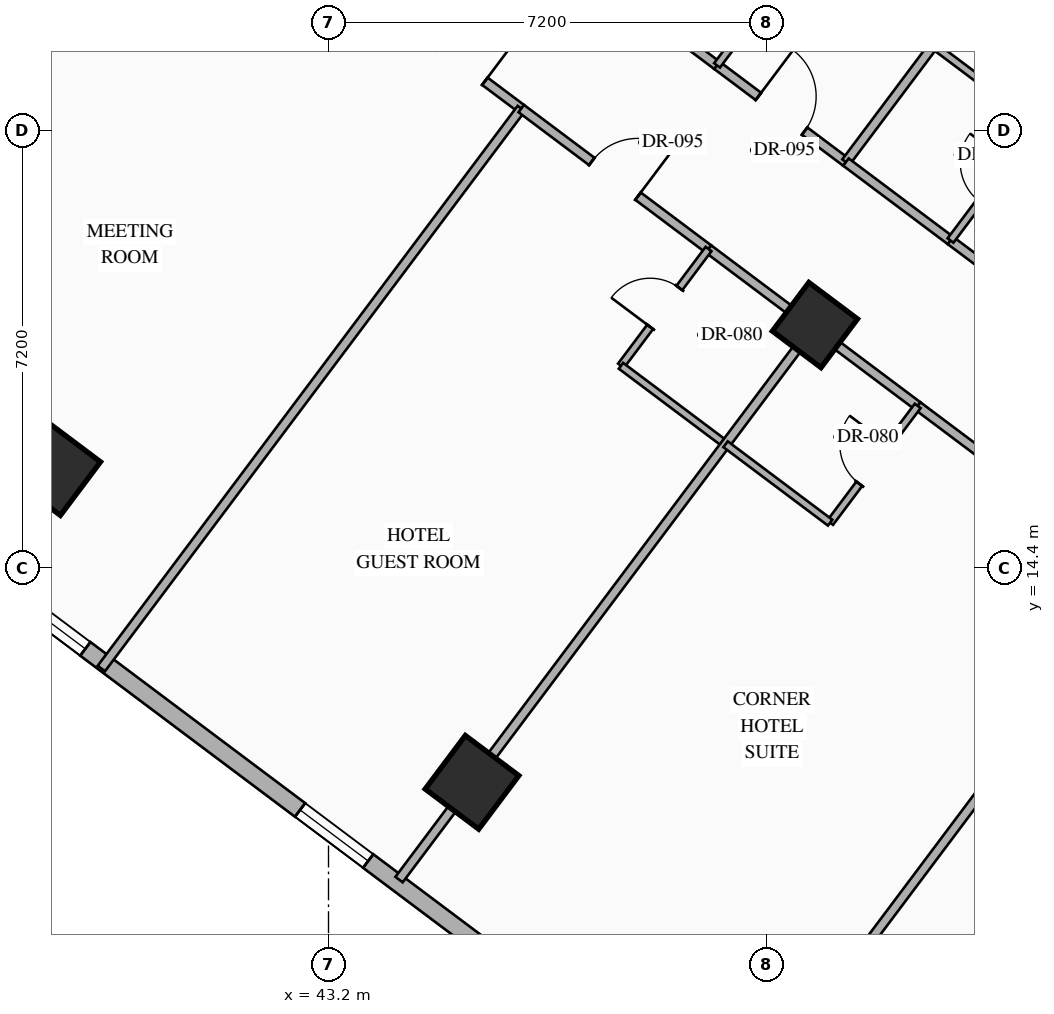
"""IFC4 building model, lengths in metres.
Left out: names, types, materials, properties, quantities, classifications, styles, units other than length and angle.
Written with IfcOpenShell. Run it as: python <this file> out.ifc"""

import sys

from ifc_helpers import new_model, si_unit, direction, frame, frame_2d, origin, origin_2d, place, context, subcontext, project, spatial, rectangle, hollow_rectangle, extrude, element, fill, save


model = new_model("IFC4")
c1 = context("Model", 3, precision=1e-05, world=origin(), true_north=direction((0.0, 1.0)))
c2 = subcontext(c1, "Body", "Model", "MODEL_VIEW")
j1 = project(units=[si_unit("LENGTHUNIT", "METRE"), si_unit("PLANEANGLEUNIT", "RADIAN")], contexts=[c1])
p1 = place(None, origin())
s1 = spatial("IfcSite", under=j1, at=p1, CompositionType="ELEMENT")
p2 = place(p1, origin())
s2 = spatial("IfcBuilding", under=s1, at=p2, CompositionType="ELEMENT")
p3 = place(p2, frame((0.0, 0.0, 50.0)))
s3 = spatial("IfcBuildingStorey", under=s2, at=p3, CompositionType="ELEMENT", Elevation=50.0)
for number, where, z_axis, x_axis in (
    (1, (38.68, 16.04, 0.0), (0.0, 0.0, 1.0), (0.8, -0.6, 0.0)),
    (2, (45.56, 10.88, 0.0), (0.0, 0.0, 1.0), (0.8, -0.6, 0.0)),
):
    element("IfcColumn", number, at=place(p3, frame(where, z_axis=z_axis, x_axis=x_axis)), inside=s3, PredefinedType="COLUMN", context=c2, shape_type="SweptSolid", body=[
        extrude(hollow_rectangle(XDim=1.1, YDim=1.1, WallThickness=0.04, at=origin_2d()), origin(), (0.0, 0.0, 1.0), 3.35),
    ])
p4 = place(p3, frame((51.2, 18.4, 0.0), z_axis=(0.0, 0.0, 1.0), x_axis=(0.799999996291, -0.600000004945, 0.0)))
e3 = element("IfcColumn", 3, at=p4, inside=s3, PredefinedType="COLUMN", context=c2, shape_type="SweptSolid", body=[
    extrude(hollow_rectangle(XDim=1.0, YDim=1.0, WallThickness=0.038, at=origin_2d()), origin(), (0.0, 0.0, 1.0), 3.35),
])
p5 = place(p3, frame((44.86, 40.73, 0.0), z_axis=(0.0, 0.0, 1.0), x_axis=(0.800006902154, -0.599990797017, 0.0)))
e4 = element("IfcWall", 4, at=p5, inside=s3, PredefinedType="STANDARD", context=c2, shape_type="SweptSolid", body=[
    extrude(rectangle(XDim=29.712, YDim=0.28, at=frame_2d((14.856, 0.0))), origin(), (0.0, 0.0, 1.0), 3.13),
])
p6 = place(p5, frame((14.249, 0.0, 0.0)))
e5 = element("IfcOpeningElement", 5, at=p6, cuts=e4, PredefinedType="OPENING", context=c2, shape_type="SweptSolid", body=[
    extrude(rectangle(XDim=1.1, YDim=2.2, at=frame_2d((0.55, 1.1))), frame((0.0, 0.15, 0.0), z_axis=(0.0, -1.0, 0.0), x_axis=(1.0, 0.0, 0.0)), (0.0, 0.0, 1.0), 0.3),
])
p7 = place(p5, frame((1.612, 0.0, 0.85)))
e6 = element("IfcOpeningElement", 6, at=p7, cuts=e4, PredefinedType="OPENING", context=c2, shape_type="SweptSolid", body=[
    extrude(rectangle(XDim=1.4, YDim=1.8, at=frame_2d((0.7, 0.9))), frame((0.0, 0.15, 0.0), z_axis=(0.0, -1.0, 0.0), x_axis=(1.0, 0.0, 0.0)), (0.0, 0.0, 1.0), 0.3),
])
p8 = place(p5, frame((5.667, 0.0, 0.85)))
e7 = element("IfcOpeningElement", 7, at=p8, cuts=e4, PredefinedType="OPENING", context=c2, shape_type="SweptSolid", body=[
    extrude(rectangle(XDim=1.4, YDim=1.8, at=frame_2d((0.7, 0.9))), frame((0.0, 0.15, 0.0), z_axis=(0.0, -1.0, 0.0), x_axis=(1.0, 0.0, 0.0)), (0.0, 0.0, 1.0), 0.3),
])
p9 = place(p5, frame((9.912, 0.0, 0.85)))
e8 = element("IfcOpeningElement", 8, at=p9, cuts=e4, PredefinedType="OPENING", context=c2, shape_type="SweptSolid", body=[
    extrude(rectangle(XDim=1.4, YDim=1.8, at=frame_2d((0.7, 0.9))), frame((0.0, 0.15, 0.0), z_axis=(0.0, -1.0, 0.0), x_axis=(1.0, 0.0, 0.0)), (0.0, 0.0, 1.0), 0.3),
])
p10 = place(p5, frame((19.528, 0.0, 0.85)))
e9 = element("IfcOpeningElement", 9, at=p10, cuts=e4, PredefinedType="OPENING", context=c2, shape_type="SweptSolid", body=[
    extrude(rectangle(XDim=1.4, YDim=1.8, at=frame_2d((0.7, 0.9))), frame((0.0, 0.15, 0.0), z_axis=(0.0, -1.0, 0.0), x_axis=(1.0, 0.0, 0.0)), (0.0, 0.0, 1.0), 0.3),
])
p11 = place(p5, frame((23.451, 0.0, 0.85)))
e10 = element("IfcOpeningElement", 10, at=p11, cuts=e4, PredefinedType="OPENING", context=c2, shape_type="SweptSolid", body=[
    extrude(rectangle(XDim=1.4, YDim=1.8, at=frame_2d((0.7, 0.9))), frame((0.0, 0.15, 0.0), z_axis=(0.0, -1.0, 0.0), x_axis=(1.0, 0.0, 0.0)), (0.0, 0.0, 1.0), 0.3),
])
p12 = place(p5, frame((27.852, 0.0, 0.85)))
e11 = element("IfcOpeningElement", 11, at=p12, cuts=e4, PredefinedType="OPENING", context=c2, shape_type="SweptSolid", body=[
    extrude(rectangle(XDim=1.4, YDim=1.8, at=frame_2d((0.7, 0.9))), frame((0.0, 0.15, 0.0), z_axis=(0.0, -1.0, 0.0), x_axis=(1.0, 0.0, 0.0)), (0.0, 0.0, 1.0), 0.3),
])
p13 = place(p3, frame((53.318, 2.487, 0.0), z_axis=(0.0, 0.0, 1.0), x_axis=(-0.800004174678, 0.599994433723, 0.0)))
e12 = element("IfcWall", 12, at=p13, inside=s3, PredefinedType="STANDARD", context=c2, shape_type="SweptSolid", body=[
    extrude(rectangle(XDim=35.089, YDim=0.28, at=frame_2d((17.544, 0.0))), origin(), (0.0, 0.0, 1.0), 3.13),
])
p14 = place(p13, frame((1.931, 0.0, 0.85)))
e13 = element("IfcOpeningElement", 13, at=p14, cuts=e12, PredefinedType="OPENING", context=c2, shape_type="SweptSolid", body=[
    extrude(rectangle(XDim=1.4, YDim=1.8, at=frame_2d((0.7, 0.9))), frame((0.0, 0.15, 0.0), z_axis=(0.0, -1.0, 0.0), x_axis=(1.0, 0.0, 0.0)), (0.0, 0.0, 1.0), 0.3),
])
p15 = place(p13, frame((6.819, 0.0, 0.85)))
e14 = element("IfcOpeningElement", 14, at=p15, cuts=e12, PredefinedType="OPENING", context=c2, shape_type="SweptSolid", body=[
    extrude(rectangle(XDim=1.4, YDim=1.8, at=frame_2d((0.7, 0.9))), frame((0.0, 0.15, 0.0), z_axis=(0.0, -1.0, 0.0), x_axis=(1.0, 0.0, 0.0)), (0.0, 0.0, 1.0), 0.3),
])
p16 = place(p13, frame((11.832, 0.0, 0.85)))
e15 = element("IfcOpeningElement", 15, at=p16, cuts=e12, PredefinedType="OPENING", context=c2, shape_type="SweptSolid", body=[
    extrude(rectangle(XDim=1.4, YDim=1.8, at=frame_2d((0.7, 0.9))), frame((0.0, 0.15, 0.0), z_axis=(0.0, -1.0, 0.0), x_axis=(1.0, 0.0, 0.0)), (0.0, 0.0, 1.0), 0.3),
])
p17 = place(p13, frame((17.647, 0.0, 0.85)))
e16 = element("IfcOpeningElement", 16, at=p17, cuts=e12, PredefinedType="OPENING", context=c2, shape_type="SweptSolid", body=[
    extrude(rectangle(XDim=1.4, YDim=1.8, at=frame_2d((0.7, 0.9))), frame((0.0, 0.15, 0.0), z_axis=(0.0, -1.0, 0.0), x_axis=(1.0, 0.0, 0.0)), (0.0, 0.0, 1.0), 0.3),
])
p18 = place(p13, frame((21.857, 0.0, 0.85)))
e17 = element("IfcOpeningElement", 17, at=p18, cuts=e12, PredefinedType="OPENING", context=c2, shape_type="SweptSolid", body=[
    extrude(rectangle(XDim=1.4, YDim=1.8, at=frame_2d((0.7, 0.9))), frame((0.0, 0.15, 0.0), z_axis=(0.0, -1.0, 0.0), x_axis=(1.0, 0.0, 0.0)), (0.0, 0.0, 1.0), 0.3),
])
p19 = place(p13, frame((26.87, 0.0, 0.85)))
e18 = element("IfcOpeningElement", 18, at=p19, cuts=e12, PredefinedType="OPENING", context=c2, shape_type="SweptSolid", body=[
    extrude(rectangle(XDim=1.4, YDim=1.8, at=frame_2d((0.7, 0.9))), frame((0.0, 0.15, 0.0), z_axis=(0.0, -1.0, 0.0), x_axis=(1.0, 0.0, 0.0)), (0.0, 0.0, 1.0), 0.3),
])
p20 = place(p13, frame((31.757, 0.0, 0.85)))
e19 = element("IfcOpeningElement", 19, at=p20, cuts=e12, PredefinedType="OPENING", context=c2, shape_type="SweptSolid", body=[
    extrude(rectangle(XDim=1.4, YDim=1.8, at=frame_2d((0.7, 0.9))), frame((0.0, 0.15, 0.0), z_axis=(0.0, -1.0, 0.0), x_axis=(1.0, 0.0, 0.0)), (0.0, 0.0, 1.0), 0.3),
])
p21 = place(p3, frame((43.037, 24.46, 0.0), z_axis=(0.0, 0.0, 1.0), x_axis=(0.799971872363, -0.600037501685, 0.0)))
e20 = element("IfcWall", 20, at=p21, inside=s3, PredefinedType="PARTITIONING", context=c2, shape_type="SweptSolid", body=[
    extrude(rectangle(XDim=4.167, YDim=0.15, at=frame_2d((2.083, 0.0))), origin(), (0.0, 0.0, 1.0), 2.425),
])
p22 = place(p21, frame((2.468, 0.0, 0.0)))
e21 = element("IfcOpeningElement", 21, at=p22, cuts=e20, PredefinedType="OPENING", context=c2, shape_type="SweptSolid", body=[
    extrude(rectangle(XDim=0.95, YDim=2.15, at=frame_2d((0.475, 1.075))), frame((0.0, 0.085, 0.0), z_axis=(0.0, -1.0, 0.0), x_axis=(1.0, 0.0, 0.0)), (0.0, 0.0, 1.0), 0.17),
])
p23 = place(p3, frame((33.384, 17.312, 0.0), z_axis=(0.0, 0.0, 1.0), x_axis=(0.600008743659, 0.799993442181, 0.0)))
e22 = element("IfcWall", 22, at=p23, inside=s3, PredefinedType="PARTITIONING", context=c2, shape_type="SweptSolid", body=[
    extrude(rectangle(XDim=8.935, YDim=0.15, at=frame_2d((4.468, 0.0))), origin(), (0.0, 0.0, 1.0), 3.13),
])
p24 = place(p3, frame((39.464, 12.752, 0.0), z_axis=(0.0, 0.0, 1.0), x_axis=(0.6, 0.8, 0.0)))
e23 = element("IfcWall", 23, at=p24, inside=s3, PredefinedType="PARTITIONING", context=c2, shape_type="SweptSolid", body=[
    extrude(rectangle(XDim=11.51, YDim=0.15, at=frame_2d((5.755, 0.0))), origin(), (0.0, 0.0, 1.0), 3.13),
])
p25 = place(p3, frame((47.87, 23.96, 0.0), z_axis=(0.0, 0.0, 1.0), x_axis=(0.79998637334, -0.60001816845, 0.0)))
e24 = element("IfcWall", 24, at=p25, inside=s3, PredefinedType="PARTITIONING", context=c2, shape_type="SweptSolid", body=[
    extrude(rectangle(XDim=2.15, YDim=0.15, at=frame_2d((1.075, 0.0))), origin(), (0.0, 0.0, 1.0), 2.775),
])
p26 = place(p3, frame((49.59, 22.67, 0.0), z_axis=(0.0, 0.0, 1.0), x_axis=(0.800011056104, -0.599985258246, 0.0)))
e25 = element("IfcWall", 25, at=p26, inside=s3, PredefinedType="PARTITIONING", context=c2, shape_type="SweptSolid", body=[
    extrude(rectangle(XDim=2.65, YDim=0.15, at=frame_2d((1.325, 0.0))), origin(), (0.0, 0.0, 1.0), 2.775),
])
p27 = place(p26, frame((0.85, 0.0, 0.0)))
e26 = element("IfcOpeningElement", 26, at=p27, cuts=e25, PredefinedType="OPENING", context=c2, shape_type="SweptSolid", body=[
    extrude(rectangle(XDim=0.95, YDim=2.15, at=frame_2d((0.475, 1.075))), frame((0.0, 0.085, 0.0), z_axis=(0.0, -1.0, 0.0), x_axis=(1.0, 0.0, 0.0)), (0.0, 0.0, 1.0), 0.17),
])
p28 = place(p3, frame((49.59, 22.67, 0.0), z_axis=(0.0, 0.0, 1.0), x_axis=(0.599951172744, 0.800036618114, 0.0)))
e27 = element("IfcWall", 27, at=p28, inside=s3, PredefinedType="PARTITIONING", context=c2, shape_type="SweptSolid", body=[
    extrude(rectangle(XDim=2.4, YDim=0.12, at=frame_2d((1.2, 0.0))), origin(), (0.0, 0.0, 1.0), 3.13),
])
p29 = place(p28, frame((0.8, 0.0, 0.0)))
e28 = element("IfcOpeningElement", 28, at=p29, cuts=e27, PredefinedType="OPENING", context=c2, shape_type="SweptSolid", body=[
    extrude(rectangle(XDim=0.8, YDim=2.06, at=frame_2d((0.4, 1.03))), frame((0.0, 0.07, 0.0), z_axis=(0.0, -1.0, 0.0), x_axis=(1.0, 0.0, 0.0)), (0.0, 0.0, 1.0), 0.14),
])
p30 = place(p3, frame((51.71, 21.08, 0.0), z_axis=(0.0, 0.0, 1.0), x_axis=(0.599996617946, 0.80000253653, 0.0)))
e29 = element("IfcWall", 29, at=p30, inside=s3, PredefinedType="PARTITIONING", context=c2, shape_type="SweptSolid", body=[
    extrude(rectangle(XDim=11.55, YDim=0.15, at=frame_2d((5.775, 0.0))), origin(), (0.0, 0.0, 1.0), 3.13),
])
p31 = place(p3, frame((51.71, 21.08, 0.0), z_axis=(0.0, 0.0, 1.0), x_axis=(0.79998637334, -0.60001816845, 0.0)))
e30 = element("IfcWall", 30, at=p31, inside=s3, PredefinedType="PARTITIONING", context=c2, shape_type="SweptSolid", body=[
    extrude(rectangle(XDim=2.15, YDim=0.15, at=frame_2d((1.075, 0.0))), origin(), (0.0, 0.0, 1.0), 2.775),
])
p32 = place(p3, frame((53.43, 19.79, 0.0), z_axis=(0.0, 0.0, 1.0), x_axis=(0.8, -0.6, 0.0)))
e31 = element("IfcWall", 31, at=p32, inside=s3, PredefinedType="PARTITIONING", context=c2, shape_type="SweptSolid", body=[
    extrude(rectangle(XDim=2.65, YDim=0.15, at=frame_2d((1.325, 0.0))), origin(), (0.0, 0.0, 1.0), 2.775),
])
p33 = place(p32, frame((0.85, 0.0, 0.0)))
e32 = element("IfcOpeningElement", 32, at=p33, cuts=e31, PredefinedType="OPENING", context=c2, shape_type="SweptSolid", body=[
    extrude(rectangle(XDim=0.95, YDim=2.15, at=frame_2d((0.475, 1.075))), frame((0.0, 0.085, 0.0), z_axis=(0.0, -1.0, 0.0), x_axis=(1.0, 0.0, 0.0)), (0.0, 0.0, 1.0), 0.17),
])
p34 = place(p3, frame((53.43, 19.79, 0.0), z_axis=(0.0, 0.0, 1.0), x_axis=(0.600065100855, 0.79995117022, 0.0)))
e33 = element("IfcWall", 33, at=p34, inside=s3, PredefinedType="PARTITIONING", context=c2, shape_type="SweptSolid", body=[
    extrude(rectangle(XDim=2.4, YDim=0.12, at=frame_2d((1.2, 0.0))), origin(), (0.0, 0.0, 1.0), 3.13),
])
p35 = place(p34, frame((0.8, 0.0, 0.0)))
e34 = element("IfcOpeningElement", 34, at=p35, cuts=e33, PredefinedType="OPENING", context=c2, shape_type="SweptSolid", body=[
    extrude(rectangle(XDim=0.8, YDim=2.06, at=frame_2d((0.4, 1.03))), frame((0.0, 0.07, 0.0), z_axis=(0.0, -1.0, 0.0), x_axis=(1.0, 0.0, 0.0)), (0.0, 0.0, 1.0), 0.14),
])
p36 = place(p3, frame((53.15, 23.0, 0.0), z_axis=(0.0, 0.0, 1.0), x_axis=(0.800027249606, -0.599963665473, 0.0)))
e35 = element("IfcWall", 35, at=p36, inside=s3, PredefinedType="PARTITIONING", context=c2, shape_type="SweptSolid", body=[
    extrude(rectangle(XDim=2.15, YDim=0.12, at=frame_2d((1.075, 0.0))), origin(), (0.0, 0.0, 1.0), 3.13),
])
p37 = place(p3, frame((46.37, 21.96, 0.0), z_axis=(0.0, 0.0, 1.0), x_axis=(0.799977170108, -0.600030438649, 0.0)))
e36 = element("IfcWall", 36, at=p37, inside=s3, PredefinedType="PARTITIONING", context=c2, shape_type="SweptSolid", body=[
    extrude(rectangle(XDim=3.85, YDim=0.15, at=frame_2d((1.925, 0.0))), origin(), (0.0, 0.0, 1.0), 2.425),
])
p38 = place(p37, frame((1.45, 0.0, 0.0)))
e37 = element("IfcOpeningElement", 37, at=p38, cuts=e36, PredefinedType="OPENING", context=c2, shape_type="SweptSolid", body=[
    extrude(rectangle(XDim=0.95, YDim=2.15, at=frame_2d((0.475, 1.075))), frame((0.0, 0.085, 0.0), z_axis=(0.0, -1.0, 0.0), x_axis=(1.0, 0.0, 0.0)), (0.0, 0.0, 1.0), 0.17),
])
p39 = place(p3, frame((49.45, 19.65, 0.0), z_axis=(0.0, 0.0, 1.0), x_axis=(0.800040880289, -0.59994548908, 0.0)))
e38 = element("IfcWall", 38, at=p39, inside=s3, PredefinedType="PARTITIONING", context=c2, shape_type="SweptSolid", body=[
    extrude(rectangle(XDim=2.15, YDim=0.15, at=frame_2d((1.075, 0.0))), origin(), (0.0, 0.0, 1.0), 2.425),
])
p40 = place(p3, frame((48.01, 17.73, 0.0), z_axis=(0.0, 0.0, 1.0), x_axis=(0.6, 0.8, 0.0)))
e39 = element("IfcWall", 39, at=p40, inside=s3, PredefinedType="PARTITIONING", context=c2, shape_type="SweptSolid", body=[
    extrude(rectangle(XDim=2.4, YDim=0.12, at=frame_2d((1.2, 0.0))), origin(), (0.0, 0.0, 1.0), 3.13),
])
p41 = place(p40, frame((0.8, 0.0, 0.0)))
e40 = element("IfcOpeningElement", 40, at=p41, cuts=e39, PredefinedType="OPENING", context=c2, shape_type="SweptSolid", body=[
    extrude(rectangle(XDim=0.8, YDim=2.06, at=frame_2d((0.4, 1.03))), frame((0.0, 0.07, 0.0), z_axis=(0.0, -1.0, 0.0), x_axis=(1.0, 0.0, 0.0)), (0.0, 0.0, 1.0), 0.14),
])
p42 = place(p3, frame((48.01, 17.73, 0.0), z_axis=(0.0, 0.0, 1.0), x_axis=(0.79998637334, -0.60001816845, 0.0)))
e41 = element("IfcWall", 41, at=p42, inside=s3, PredefinedType="PARTITIONING", context=c2, shape_type="SweptSolid", body=[
    extrude(rectangle(XDim=2.15, YDim=0.12, at=frame_2d((1.075, 0.0))), origin(), (0.0, 0.0, 1.0), 3.13),
])
p43 = place(p3, frame((44.36, 9.28, 0.0), z_axis=(0.0, 0.0, 1.0), x_axis=(0.599986233332, 0.800010324816, 0.0)))
e42 = element("IfcWall", 42, at=p43, inside=s3, PredefinedType="PARTITIONING", context=c2, shape_type="SweptSolid", body=[
    extrude(rectangle(XDim=11.35, YDim=0.15, at=frame_2d((5.675, 0.0))), origin(), (0.0, 0.0, 1.0), 2.425),
])
p44 = place(p3, frame((51.17, 18.36, 0.0), z_axis=(0.0, 0.0, 1.0), x_axis=(0.79998637334, -0.60001816845, 0.0)))
e43 = element("IfcWall", 43, at=p44, inside=s3, PredefinedType="PARTITIONING", context=c2, shape_type="SweptSolid", body=[
    extrude(rectangle(XDim=2.15, YDim=0.15, at=frame_2d((1.075, 0.0))), origin(), (0.0, 0.0, 1.0), 2.425),
])
p45 = place(p3, frame((52.89, 17.07, 0.0), z_axis=(0.0, 0.0, 1.0), x_axis=(0.800012600101, -0.599983199498, 0.0)))
e44 = element("IfcWall", 44, at=p45, inside=s3, PredefinedType="PARTITIONING", context=c2, shape_type="SweptSolid", body=[
    extrude(rectangle(XDim=4.65, YDim=0.15, at=frame_2d((2.325, 0.0))), origin(), (0.0, 0.0, 1.0), 2.425),
])
p46 = place(p45, frame((1.85, 0.0, 0.0)))
e45 = element("IfcOpeningElement", 45, at=p46, cuts=e44, PredefinedType="OPENING", context=c2, shape_type="SweptSolid", body=[
    extrude(rectangle(XDim=0.95, YDim=2.15, at=frame_2d((0.475, 1.075))), frame((0.0, 0.085, 0.0), z_axis=(0.0, -1.0, 0.0), x_axis=(1.0, 0.0, 0.0)), (0.0, 0.0, 1.0), 0.17),
])
p47 = place(p3, frame((51.45, 15.15, 0.0), z_axis=(0.0, 0.0, 1.0), x_axis=(0.599951172744, 0.800036618114, 0.0)))
e46 = element("IfcWall", 46, at=p47, inside=s3, PredefinedType="PARTITIONING", context=c2, shape_type="SweptSolid", body=[
    extrude(rectangle(XDim=2.4, YDim=0.12, at=frame_2d((1.2, 0.0))), origin(), (0.0, 0.0, 1.0), 3.13),
])
p48 = place(p47, frame((0.8, 0.0, 0.0)))
e47 = element("IfcOpeningElement", 47, at=p48, cuts=e46, PredefinedType="OPENING", context=c2, shape_type="SweptSolid", body=[
    extrude(rectangle(XDim=0.8, YDim=2.06, at=frame_2d((0.4, 1.03))), frame((0.0, 0.07, 0.0), z_axis=(0.0, -1.0, 0.0), x_axis=(1.0, 0.0, 0.0)), (0.0, 0.0, 1.0), 0.14),
])
p49 = place(p3, frame((49.73, 16.44, 0.0), z_axis=(0.0, 0.0, 1.0), x_axis=(0.79998637334, -0.60001816845, 0.0)))
e48 = element("IfcWall", 48, at=p49, inside=s3, PredefinedType="PARTITIONING", context=c2, shape_type="SweptSolid", body=[
    extrude(rectangle(XDim=2.15, YDim=0.12, at=frame_2d((1.075, 0.0))), origin(), (0.0, 0.0, 1.0), 3.13),
])
p50 = place(p3, frame((49.8, 5.2, 0.0), z_axis=(0.0, 0.0, 1.0), x_axis=(0.6, 0.8, 0.0)))
e49 = element("IfcWall", 49, at=p50, inside=s3, PredefinedType="PARTITIONING", context=c2, shape_type="SweptSolid", body=[
    extrude(rectangle(XDim=11.35, YDim=0.15, at=frame_2d((5.675, 0.0))), origin(), (0.0, 0.0, 1.0), 3.13),
])
p51 = place(p16, origin())
e50 = element("IfcWindow", 50, at=p51, inside=s3, PartitioningType="SINGLE_PANEL", PredefinedType="WINDOW", context=c2, shape_type="SweptSolid", body=[
    extrude(rectangle(XDim=1.4, YDim=1.8, at=frame_2d((0.7, 0.9))), frame((0.0, 0.03, 0.0), z_axis=(0.0, -1.0, 0.0), x_axis=(1.0, 0.0, 0.0)), (0.0, 0.0, 1.0), 0.06),
])
fill(e15, e50)
p52 = place(p17, origin())
e51 = element("IfcWindow", 51, at=p52, inside=s3, PartitioningType="SINGLE_PANEL", PredefinedType="WINDOW", context=c2, shape_type="SweptSolid", body=[
    extrude(rectangle(XDim=1.4, YDim=1.8, at=frame_2d((0.7, 0.9))), frame((0.0, 0.03, 0.0), z_axis=(0.0, -1.0, 0.0), x_axis=(1.0, 0.0, 0.0)), (0.0, 0.0, 1.0), 0.06),
])
fill(e16, e51)
p53 = place(p22, origin())
e52 = element("IfcDoor", 52, at=p53, inside=s3, OperationType="SINGLE_SWING_RIGHT", PredefinedType="DOOR", context=c2, shape_type="SweptSolid", body=[
    extrude(rectangle(XDim=0.95, YDim=2.15, at=frame_2d((0.475, 1.075))), frame((0.0, 0.025, 0.0), z_axis=(0.0, -1.0, 0.0), x_axis=(1.0, 0.0, 0.0)), (0.0, 0.0, 1.0), 0.05),
])
fill(e21, e52)
p54 = place(p27, origin())
e53 = element("IfcDoor", 53, at=p54, inside=s3, OperationType="SINGLE_SWING_LEFT", PredefinedType="DOOR", context=c2, shape_type="SweptSolid", body=[
    extrude(rectangle(XDim=0.95, YDim=2.15, at=frame_2d((0.475, 1.075))), frame((0.0, 0.025, 0.0), z_axis=(0.0, -1.0, 0.0), x_axis=(1.0, 0.0, 0.0)), (0.0, 0.0, 1.0), 0.05),
])
fill(e26, e53)
p55 = place(p38, origin())
e54 = element("IfcDoor", 54, at=p55, inside=s3, OperationType="SINGLE_SWING_RIGHT", PredefinedType="DOOR", context=c2, shape_type="SweptSolid", body=[
    extrude(rectangle(XDim=0.95, YDim=2.15, at=frame_2d((0.475, 1.075))), frame((0.0, 0.025, 0.0), z_axis=(0.0, -1.0, 0.0), x_axis=(1.0, 0.0, 0.0)), (0.0, 0.0, 1.0), 0.05),
])
fill(e37, e54)
p56 = place(p41, origin())
e55 = element("IfcDoor", 55, at=p56, inside=s3, OperationType="SINGLE_SWING_LEFT", PredefinedType="DOOR", context=c2, shape_type="SweptSolid", body=[
    extrude(rectangle(XDim=0.8, YDim=2.06, at=frame_2d((0.4, 1.03))), frame((0.0, 0.025, 0.0), z_axis=(0.0, -1.0, 0.0), x_axis=(1.0, 0.0, 0.0)), (0.0, 0.0, 1.0), 0.05),
])
fill(e40, e55)
p57 = place(p48, origin())
e56 = element("IfcDoor", 56, at=p57, inside=s3, OperationType="SINGLE_SWING_RIGHT", PredefinedType="DOOR", context=c2, shape_type="SweptSolid", body=[
    extrude(rectangle(XDim=0.8, YDim=2.06, at=frame_2d((0.4, 1.03))), frame((0.0, 0.025, 0.0), z_axis=(0.0, -1.0, 0.0), x_axis=(1.0, 0.0, 0.0)), (0.0, 0.0, 1.0), 0.05),
])
fill(e47, e56)
save(model, sys.argv[1])
